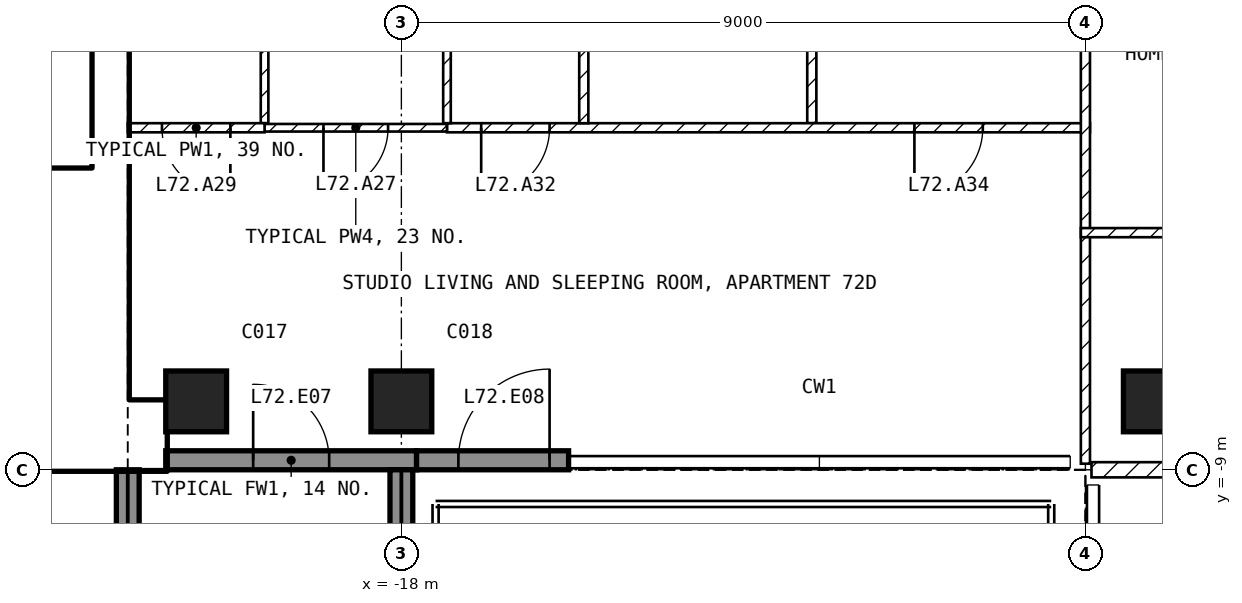
"""IFC4 building model, lengths in metres.
Left out: names, types, materials, properties, quantities, classifications, styles, units other than length and angle.
Written with IfcOpenShell. Run it as: python <this file> out.ifc"""

import sys

from ifc_helpers import new_model, si_unit, direction, frame, frame_2d, origin, origin_2d, place, context, subcontext, project, spatial, rectangle, extrude, element, fill, save


model = new_model("IFC4")
c1 = context("Model", 3, precision=1e-05, world=origin(), true_north=direction((0.0, 1.0)))
c2 = subcontext(c1, "Body", "Model", "MODEL_VIEW")
j1 = project(units=[si_unit("LENGTHUNIT", "METRE"), si_unit("PLANEANGLEUNIT", "RADIAN")], contexts=[c1])
p1 = place(None, origin())
s1 = spatial("IfcSite", under=j1, at=p1, CompositionType="ELEMENT")
p2 = place(p1, origin())
s2 = spatial("IfcBuilding", under=s1, at=p2, CompositionType="ELEMENT")
p3 = place(p2, frame((0.0, 0.0, 281.5)))
s3 = spatial("IfcBuildingStorey", under=s2, at=p3, CompositionType="ELEMENT", Elevation=281.5)
for number, where, z_axis, x_axis in (
    (1, (-20.7, -8.1, -0.25), (0.0, 0.0, 1.0), (1.0, 0.0, 0.0)),
    (2, (-18.0, -8.1, -0.25), (0.0, 0.0, 1.0), (1.0, 0.0, 0.0)),
    (3, (-8.1, -8.1, -0.25), (0.0, 0.0, 1.0), (1.0, 0.0, 0.0)),
):
    element("IfcColumn", number, at=place(p3, frame(where, z_axis=z_axis, x_axis=x_axis)), inside=s3, PredefinedType="COLUMN", context=c2, shape_type="SweptSolid", body=[
        extrude(rectangle(XDim=0.8, YDim=0.8, at=origin_2d()), origin(), (0.0, 0.0, 1.0), 3.45),
    ])
p4 = place(p3, frame((-21.1, -8.875, 0.0), z_axis=(0.0, 0.0, 1.0), x_axis=(1.0, 0.0, 0.0)))
e4 = element("IfcWall", 4, at=p4, inside=s3, PredefinedType="SOLIDWALL", context=c2, shape_type="SweptSolid", body=[
    extrude(rectangle(XDim=3.3, YDim=0.25, at=frame_2d((1.65, 0.0))), origin(), (0.0, 0.0, 1.0), 3.2),
])
p5 = place(p4, frame((1.15, 0.0, 0.0)))
e5 = element("IfcOpeningElement", 5, at=p5, cuts=e4, PredefinedType="OPENING", context=c2, shape_type="SweptSolid", body=[
    extrude(rectangle(XDim=1.0, YDim=2.4, at=frame_2d((0.5, 1.2))), frame((0.0, 0.135, 0.0), z_axis=(0.0, -1.0, 0.0), x_axis=(1.0, 0.0, 0.0)), (0.0, 0.0, 1.0), 0.27),
])
p6 = place(p3, frame((-17.8, -8.875, 0.0), z_axis=(0.0, 0.0, 1.0), x_axis=(1.0, 0.0, 0.0)))
e6 = element("IfcWall", 6, at=p6, inside=s3, PredefinedType="SOLIDWALL", context=c2, shape_type="SweptSolid", body=[
    extrude(rectangle(XDim=2.0, YDim=0.25, at=frame_2d((1.0, 0.0))), origin(), (0.0, 0.0, 1.0), 3.2),
])
p7 = place(p6, frame((0.55, 0.0, 0.0)))
e7 = element("IfcOpeningElement", 7, at=p7, cuts=e6, PredefinedType="OPENING", context=c2, shape_type="SweptSolid", body=[
    extrude(rectangle(XDim=1.2, YDim=2.4, at=frame_2d((0.6, 1.2))), frame((0.0, 0.135, 0.0), z_axis=(0.0, -1.0, 0.0), x_axis=(1.0, 0.0, 0.0)), (0.0, 0.0, 1.0), 0.27),
])
p8 = place(p3, frame((-21.6, -9.0, 0.0), z_axis=(0.0, 0.0, 1.0), x_axis=(0.0, -1.0, 0.0)))
e8 = element("IfcWall", 8, at=p8, inside=s3, PredefinedType="SOLIDWALL", context=c2, shape_type="SweptSolid", body=[
    extrude(rectangle(XDim=2.7, YDim=0.3, at=frame_2d((1.35, 0.0))), origin(), (0.0, 0.0, 1.0), 3.2),
])
p9 = place(p3, frame((-18.0, -9.0, 0.0), z_axis=(0.0, 0.0, 1.0), x_axis=(0.0, -1.0, 0.0)))
e9 = element("IfcWall", 9, at=p9, inside=s3, PredefinedType="SOLIDWALL", context=c2, shape_type="SweptSolid", body=[
    extrude(rectangle(XDim=2.74, YDim=0.3, at=frame_2d((1.37, 0.0))), origin(), (0.0, 0.0, 1.0), 3.2),
])
p10 = place(p3, frame((-30.2, -8.55, 0.0), z_axis=(0.0, 0.0, 1.0), x_axis=(1.0, 0.0, 0.0)))
e10 = element("IfcWall", 10, at=p10, inside=s3, PredefinedType="SHEAR", context=c2, shape_type="SweptSolid", body=[
    extrude(rectangle(XDim=9.1, YDim=0.9, at=frame_2d((4.55, 0.0))), origin(), (0.0, 0.0, 1.0), 3.2),
])
p11 = place(p3, frame((-21.825, -8.1, 0.0), z_axis=(0.0, 0.0, 1.0), x_axis=(0.0, 1.0, 0.0)))
e11 = element("IfcWall", 11, at=p11, inside=s3, PredefinedType="SHEAR", context=c2, shape_type="SweptSolid", body=[
    extrude(rectangle(XDim=6.9, YDim=0.45, at=frame_2d((3.45, 0.0))), origin(), (0.0, 0.0, 1.0), 3.2),
])
p12 = place(p3, frame((-28.35, -5.15, 0.0), z_axis=(0.0, 0.0, 1.0), x_axis=(1.0, 0.0, 0.0)))
e12 = element("IfcWall", 12, at=p12, inside=s3, PredefinedType="SOLIDWALL", context=c2, shape_type="SweptSolid", body=[
    extrude(rectangle(XDim=6.3, YDim=0.2, at=frame_2d((3.15, 0.0))), origin(), (0.0, 0.0, 1.0), 3.2),
])
p13 = place(p12, frame((5.1, 0.0, 0.0)))
e13 = element("IfcOpeningElement", 13, at=p13, cuts=e12, PredefinedType="OPENING", context=c2, shape_type="SweptSolid", body=[
    extrude(rectangle(XDim=1.0, YDim=2.1, at=frame_2d((0.5, 1.05))), frame((0.0, 0.11, 0.0), z_axis=(0.0, -1.0, 0.0), x_axis=(1.0, 0.0, 0.0)), (0.0, 0.0, 1.0), 0.22),
])
p14 = place(p3, frame((8.92, -9.0, 0.0), z_axis=(0.0, 0.0, 1.0), x_axis=(-1.0, 0.0, 0.0)))
e14 = element("IfcWall", 14, at=p14, inside=s3, PredefinedType="PARTITIONING", context=c2, shape_type="SweptSolid", body=[
    extrude(rectangle(XDim=17.84, YDim=0.2, at=frame_2d((8.92, 0.0))), origin(), (0.0, 0.0, 1.0), 3.2),
])
p15 = place(p14, frame((8.42, 0.0, 0.0)))
e15 = element("IfcOpeningElement", 15, at=p15, cuts=e14, PredefinedType="OPENING", context=c2, shape_type="SweptSolid", body=[
    extrude(rectangle(XDim=1.0, YDim=2.1, at=frame_2d((0.5, 1.05))), frame((0.0, 0.11, 0.0), z_axis=(0.0, -1.0, 0.0), x_axis=(1.0, 0.0, 0.0)), (0.0, 0.0, 1.0), 0.22),
])
p16 = place(p3, frame((-12.6, -4.44, 0.0), z_axis=(0.0, 0.0, 1.0), x_axis=(0.0, 1.0, 0.0)))
e16 = element("IfcWall", 16, at=p16, inside=s3, PredefinedType="PARTITIONING", context=c2, shape_type="SweptSolid", body=[
    extrude(rectangle(XDim=3.14, YDim=0.12, at=frame_2d((1.57, 0.0))), origin(), (0.0, 0.0, 1.0), 3.2),
])
p17 = place(p16, frame((1.12, 0.0, 0.0)))
e17 = element("IfcOpeningElement", 17, at=p17, cuts=e16, PredefinedType="OPENING", context=c2, shape_type="SweptSolid", body=[
    extrude(rectangle(XDim=0.9, YDim=2.1, at=frame_2d((0.45, 1.05))), frame((0.0, 0.07, 0.0), z_axis=(0.0, -1.0, 0.0), x_axis=(1.0, 0.0, 0.0)), (0.0, 0.0, 1.0), 0.14),
])
p18 = place(p3, frame((-8.94, -4.5, 0.0), z_axis=(0.0, 0.0, 1.0), x_axis=(-1.0, 0.0, 0.0)))
e18 = element("IfcWall", 18, at=p18, inside=s3, PredefinedType="PARTITIONING", context=c2, shape_type="SweptSolid", body=[
    extrude(rectangle(XDim=8.46, YDim=0.12, at=frame_2d((4.23, 0.0))), origin(), (0.0, 0.0, 1.0), 3.2),
])
p19 = place(p18, frame((7.11, 0.0, 0.0)))
e19 = element("IfcOpeningElement", 19, at=p19, cuts=e18, PredefinedType="OPENING", context=c2, shape_type="SweptSolid", body=[
    extrude(rectangle(XDim=0.9, YDim=2.1, at=frame_2d((0.45, 1.05))), frame((0.0, 0.07, 0.0), z_axis=(0.0, -1.0, 0.0), x_axis=(1.0, 0.0, 0.0)), (0.0, 0.0, 1.0), 0.14),
])
p20 = place(p18, frame((1.41, 0.0, 0.0)))
e20 = element("IfcOpeningElement", 20, at=p20, cuts=e18, PredefinedType="OPENING", context=c2, shape_type="SweptSolid", body=[
    extrude(rectangle(XDim=0.9, YDim=2.1, at=frame_2d((0.45, 1.05))), frame((0.0, 0.07, 0.0), z_axis=(0.0, -1.0, 0.0), x_axis=(1.0, 0.0, 0.0)), (0.0, 0.0, 1.0), 0.14),
])
p21 = place(p3, frame((-9.0, -1.3, 0.0), z_axis=(0.0, 0.0, 1.0), x_axis=(0.0, -1.0, 0.0)))
e21 = element("IfcWall", 21, at=p21, inside=s3, PredefinedType="PARTITIONING", context=c2, shape_type="SweptSolid", body=[
    extrude(rectangle(XDim=7.62, YDim=0.12, at=frame_2d((3.81, 0.0))), origin(), (0.0, 0.0, 1.0), 3.2),
])
p22 = place(p21, frame((1.15, 0.0, 0.0)))
e22 = element("IfcOpeningElement", 22, at=p22, cuts=e21, PredefinedType="OPENING", context=c2, shape_type="SweptSolid", body=[
    extrude(rectangle(XDim=0.9, YDim=2.1, at=frame_2d((0.45, 1.05))), frame((0.0, 0.07, 0.0), z_axis=(0.0, -1.0, 0.0), x_axis=(1.0, 0.0, 0.0)), (0.0, 0.0, 1.0), 0.14),
])
p23 = place(p3, frame((-15.6, -4.44, 0.0), z_axis=(0.0, 0.0, 1.0), x_axis=(0.0, 1.0, 0.0)))
e23 = element("IfcWall", 23, at=p23, inside=s3, PredefinedType="PARTITIONING", context=c2, shape_type="SweptSolid", body=[
    extrude(rectangle(XDim=3.14, YDim=0.12, at=frame_2d((1.57, 0.0))), origin(), (0.0, 0.0, 1.0), 3.2),
])
for number, where, z_axis, x_axis in (
    (24, (-17.4, -4.44, 0.0), (0.0, 0.0, 1.0), (0.0, 1.0, 0.0)),
    (25, (-19.8, -4.44, 0.0), (0.0, 0.0, 1.0), (0.0, 1.0, 0.0)),
):
    element("IfcWall", number, at=place(p3, frame(where, z_axis=z_axis, x_axis=x_axis)), inside=s3, PredefinedType="PARTITIONING", context=c2, shape_type="SweptSolid", body=[
        extrude(rectangle(XDim=3.14, YDim=0.1, at=frame_2d((1.57, 0.0))), origin(), (0.0, 0.0, 1.0), 3.2),
    ])
p24 = place(p3, frame((-17.4, -4.5, 0.0), z_axis=(0.0, 0.0, 1.0), x_axis=(-1.0, 0.0, 0.0)))
e26 = element("IfcWall", 26, at=p24, inside=s3, PredefinedType="PARTITIONING", context=c2, shape_type="SweptSolid", body=[
    extrude(rectangle(XDim=2.4, YDim=0.1, at=frame_2d((1.2, 0.0))), origin(), (0.0, 0.0, 1.0), 3.2),
])
p25 = place(p24, frame((0.775, 0.0, 0.0)))
e27 = element("IfcOpeningElement", 27, at=p25, cuts=e26, PredefinedType="OPENING", context=c2, shape_type="SweptSolid", body=[
    extrude(rectangle(XDim=0.85, YDim=2.1, at=frame_2d((0.425, 1.05))), frame((0.0, 0.06, 0.0), z_axis=(0.0, -1.0, 0.0), x_axis=(1.0, 0.0, 0.0)), (0.0, 0.0, 1.0), 0.12),
])
p26 = place(p3, frame((-19.8, -4.5, 0.0), z_axis=(0.0, 0.0, 1.0), x_axis=(-1.0, 0.0, 0.0)))
e28 = element("IfcWall", 28, at=p26, inside=s3, PredefinedType="PARTITIONING", context=c2, shape_type="SweptSolid", body=[
    extrude(rectangle(XDim=1.8, YDim=0.12, at=frame_2d((0.9, 0.0))), origin(), (0.0, 0.0, 1.0), 3.2),
])
p27 = place(p26, frame((0.45, 0.0, 0.0)))
e29 = element("IfcOpeningElement", 29, at=p27, cuts=e28, PredefinedType="OPENING", context=c2, shape_type="SweptSolid", body=[
    extrude(rectangle(XDim=0.9, YDim=2.1, at=frame_2d((0.45, 1.05))), frame((0.0, 0.07, 0.0), z_axis=(0.0, -1.0, 0.0), x_axis=(1.0, 0.0, 0.0)), (0.0, 0.0, 1.0), 0.14),
])
p28 = place(p3, frame((-4.44, -5.88, 0.0), z_axis=(0.0, 0.0, 1.0), x_axis=(-1.0, 0.0, 0.0)))
e30 = element("IfcWall", 30, at=p28, inside=s3, PredefinedType="PARTITIONING", context=c2, shape_type="SweptSolid", body=[
    extrude(rectangle(XDim=4.62, YDim=0.12, at=frame_2d((2.31, 0.0))), origin(), (0.0, 0.0, 1.0), 3.2),
])
p29 = place(p28, frame((1.86, 0.0, 0.0)))
e31 = element("IfcOpeningElement", 31, at=p29, cuts=e30, PredefinedType="OPENING", context=c2, shape_type="SweptSolid", body=[
    extrude(rectangle(XDim=0.9, YDim=2.1, at=frame_2d((0.45, 1.05))), frame((0.0, 0.07, 0.0), z_axis=(0.0, -1.0, 0.0), x_axis=(1.0, 0.0, 0.0)), (0.0, 0.0, 1.0), 0.14),
])
p30 = place(p5, origin())
e32 = element("IfcDoor", 32, at=p30, inside=s3, OperationType="SINGLE_SWING_LEFT", PredefinedType="DOOR", context=c2, shape_type="SweptSolid", body=[
    extrude(rectangle(XDim=1.0, YDim=2.4, at=frame_2d((0.5, 1.2))), frame((0.0, 0.025, 0.0), z_axis=(0.0, -1.0, 0.0), x_axis=(1.0, 0.0, 0.0)), (0.0, 0.0, 1.0), 0.05),
])
fill(e5, e32)
p31 = place(p7, origin())
e33 = element("IfcDoor", 33, at=p31, inside=s3, OperationType="SINGLE_SWING_RIGHT", PredefinedType="DOOR", context=c2, shape_type="SweptSolid", body=[
    extrude(rectangle(XDim=1.2, YDim=2.4, at=frame_2d((0.6, 1.2))), frame((0.0, 0.025, 0.0), z_axis=(0.0, -1.0, 0.0), x_axis=(1.0, 0.0, 0.0)), (0.0, 0.0, 1.0), 0.05),
])
fill(e7, e33)
p32 = place(p13, origin())
e34 = element("IfcDoor", 34, at=p32, inside=s3, OperationType="SINGLE_SWING_LEFT", PredefinedType="DOOR", context=c2, shape_type="SweptSolid", body=[
    extrude(rectangle(XDim=1.0, YDim=2.1, at=frame_2d((0.5, 1.05))), frame((0.0, 0.025, 0.0), z_axis=(0.0, -1.0, 0.0), x_axis=(1.0, 0.0, 0.0)), (0.0, 0.0, 1.0), 0.05),
])
fill(e13, e34)
p33 = place(p25, origin())
e35 = element("IfcDoor", 35, at=p33, inside=s3, OperationType="SINGLE_SWING_RIGHT", PredefinedType="DOOR", context=c2, shape_type="SweptSolid", body=[
    extrude(rectangle(XDim=0.85, YDim=2.1, at=frame_2d((0.425, 1.05))), frame((0.0, 0.025, 0.0), z_axis=(0.0, -1.0, 0.0), x_axis=(1.0, 0.0, 0.0)), (0.0, 0.0, 1.0), 0.05),
])
fill(e27, e35)
p34 = place(p27, origin())
e36 = element("IfcDoor", 36, at=p34, inside=s3, OperationType="SINGLE_SWING_LEFT", PredefinedType="DOOR", context=c2, shape_type="SweptSolid", body=[
    extrude(rectangle(XDim=0.9, YDim=2.1, at=frame_2d((0.45, 1.05))), frame((0.0, 0.025, 0.0), z_axis=(0.0, -1.0, 0.0), x_axis=(1.0, 0.0, 0.0)), (0.0, 0.0, 1.0), 0.05),
])
fill(e29, e36)
p35 = place(p19, origin())
e37 = element("IfcDoor", 37, at=p35, inside=s3, OperationType="SINGLE_SWING_RIGHT", PredefinedType="DOOR", context=c2, shape_type="SweptSolid", body=[
    extrude(rectangle(XDim=0.9, YDim=2.1, at=frame_2d((0.45, 1.05))), frame((0.0, 0.025, 0.0), z_axis=(0.0, -1.0, 0.0), x_axis=(1.0, 0.0, 0.0)), (0.0, 0.0, 1.0), 0.05),
])
fill(e19, e37)
p36 = place(p20, origin())
e38 = element("IfcDoor", 38, at=p36, inside=s3, OperationType="SINGLE_SWING_RIGHT", PredefinedType="DOOR", context=c2, shape_type="SweptSolid", body=[
    extrude(rectangle(XDim=0.9, YDim=2.1, at=frame_2d((0.45, 1.05))), frame((0.0, 0.025, 0.0), z_axis=(0.0, -1.0, 0.0), x_axis=(1.0, 0.0, 0.0)), (0.0, 0.0, 1.0), 0.05),
])
fill(e20, e38)
save(model, sys.argv[1])
